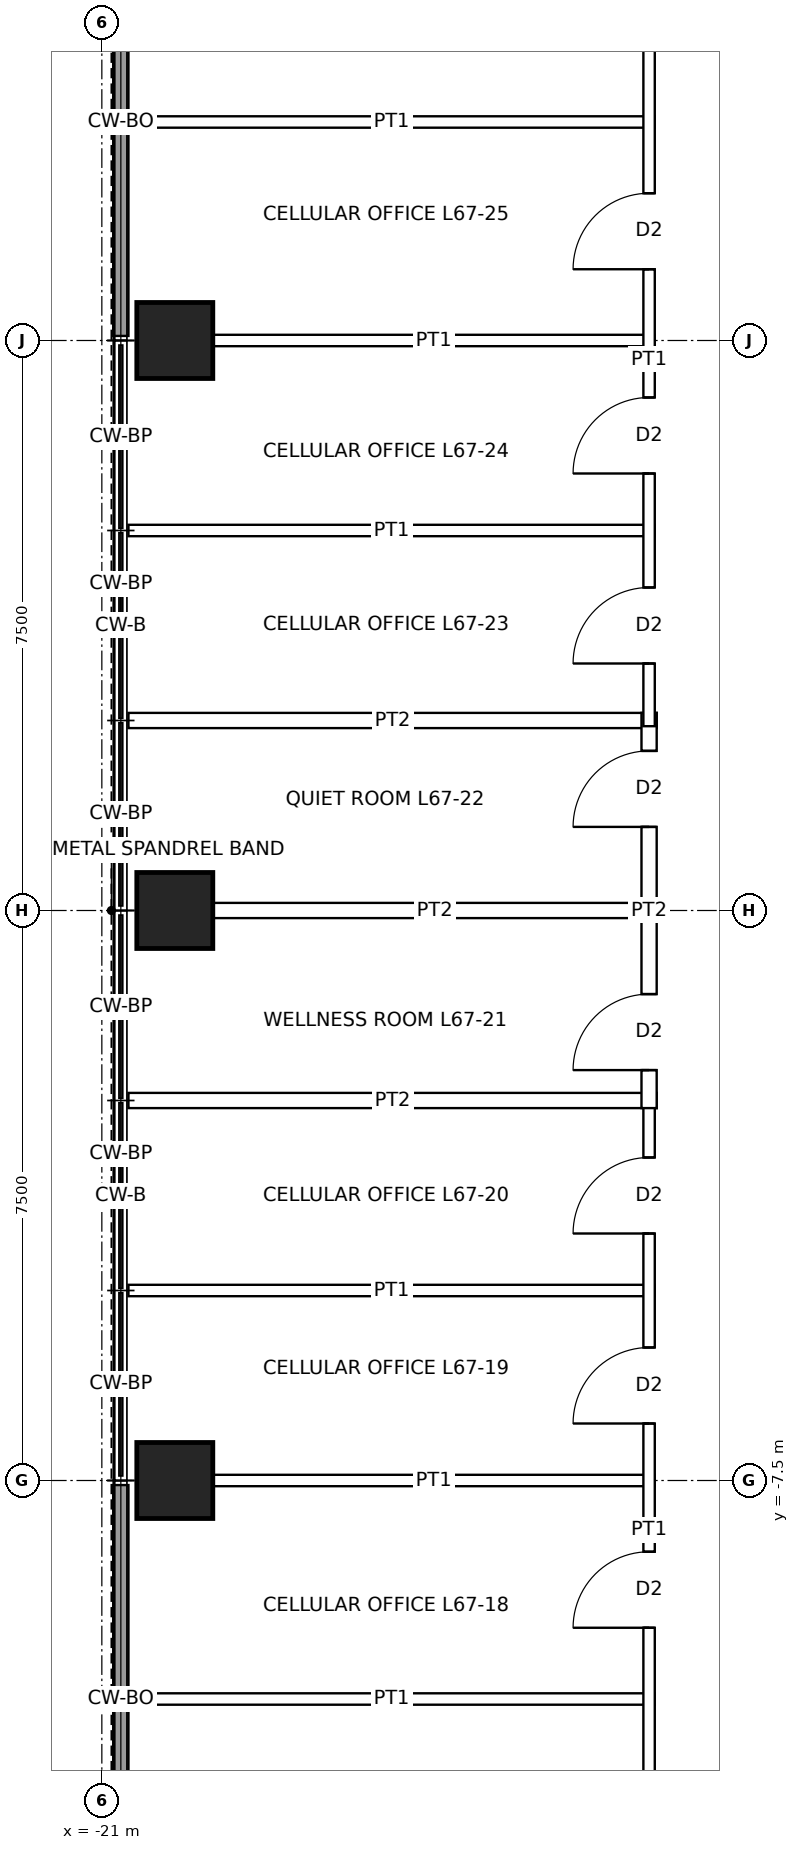
"""IFC4 building model, lengths in metres.
Left out: names, types, materials, properties, quantities, classifications, styles, units other than length and angle.
Written with IfcOpenShell. Run it as: python <this file> out.ifc"""

import sys

from ifc_helpers import new_model, si_unit, direction, frame, frame_2d, origin, origin_2d, place, context, subcontext, project, spatial, rectangle, hollow_rectangle, extrude, element, fill, save


model = new_model("IFC4")
c1 = context("Model", 3, precision=1e-05, world=origin(), true_north=direction((0.0, 1.0)))
c2 = subcontext(c1, "Body", "Model", "MODEL_VIEW")
j1 = project(units=[si_unit("LENGTHUNIT", "METRE"), si_unit("PLANEANGLEUNIT", "RADIAN")], contexts=[c1])
p1 = place(None, origin())
s1 = spatial("IfcSite", under=j1, at=p1, CompositionType="ELEMENT")
p2 = place(p1, origin())
s2 = spatial("IfcBuilding", under=s1, at=p2, CompositionType="ELEMENT")
p3 = place(p2, frame((0.0, 0.0, 303.9)))
s3 = spatial("IfcBuildingStorey", under=s2, at=p3, CompositionType="ELEMENT", Elevation=303.9)
for number, where, z_axis, x_axis in (
    (1, (-20.04, -7.5, 0.0), (0.0, 0.0, 1.0), (1.0, 0.0, 0.0)),
    (2, (-20.04, 0.0, 0.0), (0.0, 0.0, 1.0), (1.0, 0.0, 0.0)),
    (3, (-20.04, 7.5, 0.0), (0.0, 0.0, 1.0), (1.0, 0.0, 0.0)),
):
    element("IfcColumn", number, at=place(p3, frame(where, z_axis=z_axis, x_axis=x_axis)), inside=s3, PredefinedType="COLUMN", context=c2, shape_type="SweptSolid", body=[
        extrude(hollow_rectangle(XDim=1.0, YDim=1.0, WallThickness=0.075, at=origin_2d()), origin(), (0.0, 0.0, 1.0), 4.0),
    ])
for number, where, z_axis, x_axis in (
    (4, (-20.75, -13.19, 0.0), (0.0, 0.0, 1.0), (0.0, 1.0, 0.0)),
    (5, (-20.75, -10.345, 0.0), (0.0, 0.0, 1.0), (0.0, 1.0, 0.0)),
    (6, (-20.75, 7.56, 0.0), (0.0, 0.0, 1.0), (0.0, 1.0, 0.0)),
    (7, (-20.75, 10.405, 0.0), (0.0, 0.0, 1.0), (0.0, 1.0, 0.0)),
):
    element("IfcWall", number, at=place(p3, frame(where, z_axis=z_axis, x_axis=x_axis)), inside=s3, PredefinedType="SOLIDWALL", context=c2, shape_type="SweptSolid", body=[
        extrude(rectangle(XDim=2.785, YDim=0.2, at=frame_2d((1.393, 0.0))), origin(), (0.0, 0.0, 1.0), 3.85),
    ])
p4 = place(p3, frame((-20.65, -10.375, 0.0), z_axis=(0.0, 0.0, 1.0), x_axis=(1.0, 0.0, 0.0)))
e8 = element("IfcWall", 8, at=p4, inside=s3, PredefinedType="PARTITIONING", context=c2, shape_type="SweptSolid", body=[
    extrude(rectangle(XDim=6.925, YDim=0.15, at=frame_2d((3.462, 0.0))), origin(), (0.0, 0.0, 1.0), 3.85),
])
p5 = place(p3, frame((-19.54, -7.5, 0.0), z_axis=(0.0, 0.0, 1.0), x_axis=(1.0, 0.0, 0.0)))
e9 = element("IfcWall", 9, at=p5, inside=s3, PredefinedType="PARTITIONING", context=c2, shape_type="SweptSolid", body=[
    extrude(rectangle(XDim=5.815, YDim=0.15, at=frame_2d((2.907, 0.0))), origin(), (0.0, 0.0, 1.0), 3.243),
])
p6 = place(p3, frame((-20.65, -5.0, 0.0), z_axis=(0.0, 0.0, 1.0), x_axis=(1.0, 0.0, 0.0)))
e10 = element("IfcWall", 10, at=p6, inside=s3, PredefinedType="PARTITIONING", context=c2, shape_type="SweptSolid", body=[
    extrude(rectangle(XDim=6.925, YDim=0.15, at=frame_2d((3.462, 0.0))), origin(), (0.0, 0.0, 1.0), 3.85),
])
p7 = place(p3, frame((-20.65, -2.5, 0.0), z_axis=(0.0, 0.0, 1.0), x_axis=(1.0, 0.0, 0.0)))
e11 = element("IfcWall", 11, at=p7, inside=s3, PredefinedType="PARTITIONING", context=c2, shape_type="SweptSolid", body=[
    extrude(rectangle(XDim=6.95, YDim=0.2, at=frame_2d((3.475, 0.0))), origin(), (0.0, 0.0, 1.0), 3.85),
])
p8 = place(p3, frame((-19.54, 0.0, 0.0), z_axis=(0.0, 0.0, 1.0), x_axis=(1.0, 0.0, 0.0)))
e12 = element("IfcWall", 12, at=p8, inside=s3, PredefinedType="PARTITIONING", context=c2, shape_type="SweptSolid", body=[
    extrude(rectangle(XDim=5.84, YDim=0.2, at=frame_2d((2.92, 0.0))), origin(), (0.0, 0.0, 1.0), 3.243),
])
p9 = place(p3, frame((-20.65, 2.5, 0.0), z_axis=(0.0, 0.0, 1.0), x_axis=(1.0, 0.0, 0.0)))
e13 = element("IfcWall", 13, at=p9, inside=s3, PredefinedType="PARTITIONING", context=c2, shape_type="SweptSolid", body=[
    extrude(rectangle(XDim=6.95, YDim=0.2, at=frame_2d((3.475, 0.0))), origin(), (0.0, 0.0, 1.0), 3.85),
])
p10 = place(p3, frame((-20.65, 5.0, 0.0), z_axis=(0.0, 0.0, 1.0), x_axis=(1.0, 0.0, 0.0)))
e14 = element("IfcWall", 14, at=p10, inside=s3, PredefinedType="PARTITIONING", context=c2, shape_type="SweptSolid", body=[
    extrude(rectangle(XDim=6.925, YDim=0.15, at=frame_2d((3.462, 0.0))), origin(), (0.0, 0.0, 1.0), 3.85),
])
p11 = place(p3, frame((-19.54, 7.5, 0.0), z_axis=(0.0, 0.0, 1.0), x_axis=(1.0, 0.0, 0.0)))
e15 = element("IfcWall", 15, at=p11, inside=s3, PredefinedType="PARTITIONING", context=c2, shape_type="SweptSolid", body=[
    extrude(rectangle(XDim=5.815, YDim=0.15, at=frame_2d((2.907, 0.0))), origin(), (0.0, 0.0, 1.0), 3.243),
])
p12 = place(p3, frame((-20.65, 10.375, 0.0), z_axis=(0.0, 0.0, 1.0), x_axis=(1.0, 0.0, 0.0)))
e16 = element("IfcWall", 16, at=p12, inside=s3, PredefinedType="PARTITIONING", context=c2, shape_type="SweptSolid", body=[
    extrude(rectangle(XDim=6.925, YDim=0.15, at=frame_2d((3.462, 0.0))), origin(), (0.0, 0.0, 1.0), 3.85),
])
p13 = place(p3, frame((-13.8, -13.875, 0.0), z_axis=(0.0, 0.0, 1.0), x_axis=(0.0, 1.0, 0.0)))
e17 = element("IfcWall", 17, at=p13, inside=s3, PredefinedType="PARTITIONING", context=c2, shape_type="SweptSolid", body=[
    extrude(rectangle(XDim=11.45, YDim=0.15, at=frame_2d((5.725, 0.0))), origin(), (0.0, 0.0, 1.0), 3.85),
])
p14 = place(p13, frame((4.438, 0.0, 0.0)))
e18 = element("IfcOpeningElement", 18, at=p14, cuts=e17, PredefinedType="OPENING", context=c2, shape_type="SweptSolid", body=[
    extrude(rectangle(XDim=1.0, YDim=2.1, at=frame_2d((0.5, 1.05))), frame((0.0, 0.085, 0.0), z_axis=(0.0, -1.0, 0.0), x_axis=(1.0, 0.0, 0.0)), (0.0, 0.0, 1.0), 0.17),
])
p15 = place(p13, frame((7.125, 0.0, 0.0)))
e19 = element("IfcOpeningElement", 19, at=p15, cuts=e17, PredefinedType="OPENING", context=c2, shape_type="SweptSolid", body=[
    extrude(rectangle(XDim=1.0, YDim=2.1, at=frame_2d((0.5, 1.05))), frame((0.0, 0.085, 0.0), z_axis=(0.0, -1.0, 0.0), x_axis=(1.0, 0.0, 0.0)), (0.0, 0.0, 1.0), 0.17),
])
p16 = place(p13, frame((9.625, 0.0, 0.0)))
e20 = element("IfcOpeningElement", 20, at=p16, cuts=e17, PredefinedType="OPENING", context=c2, shape_type="SweptSolid", body=[
    extrude(rectangle(XDim=1.0, YDim=2.1, at=frame_2d((0.5, 1.05))), frame((0.0, 0.085, 0.0), z_axis=(0.0, -1.0, 0.0), x_axis=(1.0, 0.0, 0.0)), (0.0, 0.0, 1.0), 0.17),
])
p17 = place(p3, frame((-13.8, -2.6, 0.0), z_axis=(0.0, 0.0, 1.0), x_axis=(0.0, 1.0, 0.0)))
e21 = element("IfcWall", 21, at=p17, inside=s3, PredefinedType="PARTITIONING", context=c2, shape_type="SweptSolid", body=[
    extrude(rectangle(XDim=5.2, YDim=0.2, at=frame_2d((2.6, 0.0))), origin(), (0.0, 0.0, 1.0), 3.85),
])
p18 = place(p17, frame((0.5, 0.0, 0.0)))
e22 = element("IfcOpeningElement", 22, at=p18, cuts=e21, PredefinedType="OPENING", context=c2, shape_type="SweptSolid", body=[
    extrude(rectangle(XDim=1.0, YDim=2.1, at=frame_2d((0.5, 1.05))), frame((0.0, 0.11, 0.0), z_axis=(0.0, -1.0, 0.0), x_axis=(1.0, 0.0, 0.0)), (0.0, 0.0, 1.0), 0.22),
])
p19 = place(p17, frame((3.7, 0.0, 0.0)))
e23 = element("IfcOpeningElement", 23, at=p19, cuts=e21, PredefinedType="OPENING", context=c2, shape_type="SweptSolid", body=[
    extrude(rectangle(XDim=1.0, YDim=2.1, at=frame_2d((0.5, 1.05))), frame((0.0, 0.11, 0.0), z_axis=(0.0, -1.0, 0.0), x_axis=(1.0, 0.0, 0.0)), (0.0, 0.0, 1.0), 0.22),
])
p20 = place(p3, frame((-13.8, 2.425, 0.0), z_axis=(0.0, 0.0, 1.0), x_axis=(0.0, 1.0, 0.0)))
e24 = element("IfcWall", 24, at=p20, inside=s3, PredefinedType="PARTITIONING", context=c2, shape_type="SweptSolid", body=[
    extrude(rectangle(XDim=9.65, YDim=0.15, at=frame_2d((4.825, 0.0))), origin(), (0.0, 0.0, 1.0), 3.85),
])
p21 = place(p20, frame((0.825, 0.0, 0.0)))
e25 = element("IfcOpeningElement", 25, at=p21, cuts=e24, PredefinedType="OPENING", context=c2, shape_type="SweptSolid", body=[
    extrude(rectangle(XDim=1.0, YDim=2.1, at=frame_2d((0.5, 1.05))), frame((0.0, 0.085, 0.0), z_axis=(0.0, -1.0, 0.0), x_axis=(1.0, 0.0, 0.0)), (0.0, 0.0, 1.0), 0.17),
])
p22 = place(p20, frame((3.325, 0.0, 0.0)))
e26 = element("IfcOpeningElement", 26, at=p22, cuts=e24, PredefinedType="OPENING", context=c2, shape_type="SweptSolid", body=[
    extrude(rectangle(XDim=1.0, YDim=2.1, at=frame_2d((0.5, 1.05))), frame((0.0, 0.085, 0.0), z_axis=(0.0, -1.0, 0.0), x_axis=(1.0, 0.0, 0.0)), (0.0, 0.0, 1.0), 0.17),
])
p23 = place(p20, frame((6.012, 0.0, 0.0)))
e27 = element("IfcOpeningElement", 27, at=p23, cuts=e24, PredefinedType="OPENING", context=c2, shape_type="SweptSolid", body=[
    extrude(rectangle(XDim=1.0, YDim=2.1, at=frame_2d((0.5, 1.05))), frame((0.0, 0.085, 0.0), z_axis=(0.0, -1.0, 0.0), x_axis=(1.0, 0.0, 0.0)), (0.0, 0.0, 1.0), 0.17),
])
p24 = place(p14, origin())
e28 = element("IfcDoor", 28, at=p24, inside=s3, OperationType="SINGLE_SWING_LEFT", PredefinedType="DOOR", context=c2, shape_type="SweptSolid", body=[
    extrude(rectangle(XDim=1.0, YDim=2.1, at=frame_2d((0.5, 1.05))), frame((0.0, 0.025, 0.0), z_axis=(0.0, -1.0, 0.0), x_axis=(1.0, 0.0, 0.0)), (0.0, 0.0, 1.0), 0.05),
])
fill(e18, e28)
p25 = place(p15, origin())
e29 = element("IfcDoor", 29, at=p25, inside=s3, OperationType="SINGLE_SWING_LEFT", PredefinedType="DOOR", context=c2, shape_type="SweptSolid", body=[
    extrude(rectangle(XDim=1.0, YDim=2.1, at=frame_2d((0.5, 1.05))), frame((0.0, 0.025, 0.0), z_axis=(0.0, -1.0, 0.0), x_axis=(1.0, 0.0, 0.0)), (0.0, 0.0, 1.0), 0.05),
])
fill(e19, e29)
p26 = place(p16, origin())
e30 = element("IfcDoor", 30, at=p26, inside=s3, OperationType="SINGLE_SWING_LEFT", PredefinedType="DOOR", context=c2, shape_type="SweptSolid", body=[
    extrude(rectangle(XDim=1.0, YDim=2.1, at=frame_2d((0.5, 1.05))), frame((0.0, 0.025, 0.0), z_axis=(0.0, -1.0, 0.0), x_axis=(1.0, 0.0, 0.0)), (0.0, 0.0, 1.0), 0.05),
])
fill(e20, e30)
p27 = place(p18, origin())
e31 = element("IfcDoor", 31, at=p27, inside=s3, OperationType="SINGLE_SWING_LEFT", PredefinedType="DOOR", context=c2, shape_type="SweptSolid", body=[
    extrude(rectangle(XDim=1.0, YDim=2.1, at=frame_2d((0.5, 1.05))), frame((0.0, 0.025, 0.0), z_axis=(0.0, -1.0, 0.0), x_axis=(1.0, 0.0, 0.0)), (0.0, 0.0, 1.0), 0.05),
])
fill(e22, e31)
p28 = place(p19, origin())
e32 = element("IfcDoor", 32, at=p28, inside=s3, OperationType="SINGLE_SWING_LEFT", PredefinedType="DOOR", context=c2, shape_type="SweptSolid", body=[
    extrude(rectangle(XDim=1.0, YDim=2.1, at=frame_2d((0.5, 1.05))), frame((0.0, 0.025, 0.0), z_axis=(0.0, -1.0, 0.0), x_axis=(1.0, 0.0, 0.0)), (0.0, 0.0, 1.0), 0.05),
])
fill(e23, e32)
p29 = place(p21, origin())
e33 = element("IfcDoor", 33, at=p29, inside=s3, OperationType="SINGLE_SWING_LEFT", PredefinedType="DOOR", context=c2, shape_type="SweptSolid", body=[
    extrude(rectangle(XDim=1.0, YDim=2.1, at=frame_2d((0.5, 1.05))), frame((0.0, 0.025, 0.0), z_axis=(0.0, -1.0, 0.0), x_axis=(1.0, 0.0, 0.0)), (0.0, 0.0, 1.0), 0.05),
])
fill(e25, e33)
p30 = place(p22, origin())
e34 = element("IfcDoor", 34, at=p30, inside=s3, OperationType="SINGLE_SWING_LEFT", PredefinedType="DOOR", context=c2, shape_type="SweptSolid", body=[
    extrude(rectangle(XDim=1.0, YDim=2.1, at=frame_2d((0.5, 1.05))), frame((0.0, 0.025, 0.0), z_axis=(0.0, -1.0, 0.0), x_axis=(1.0, 0.0, 0.0)), (0.0, 0.0, 1.0), 0.05),
])
fill(e26, e34)
p31 = place(p23, origin())
e35 = element("IfcDoor", 35, at=p31, inside=s3, OperationType="SINGLE_SWING_LEFT", PredefinedType="DOOR", context=c2, shape_type="SweptSolid", body=[
    extrude(rectangle(XDim=1.0, YDim=2.1, at=frame_2d((0.5, 1.05))), frame((0.0, 0.025, 0.0), z_axis=(0.0, -1.0, 0.0), x_axis=(1.0, 0.0, 0.0)), (0.0, 0.0, 1.0), 0.05),
])
fill(e27, e35)
save(model, sys.argv[1])
